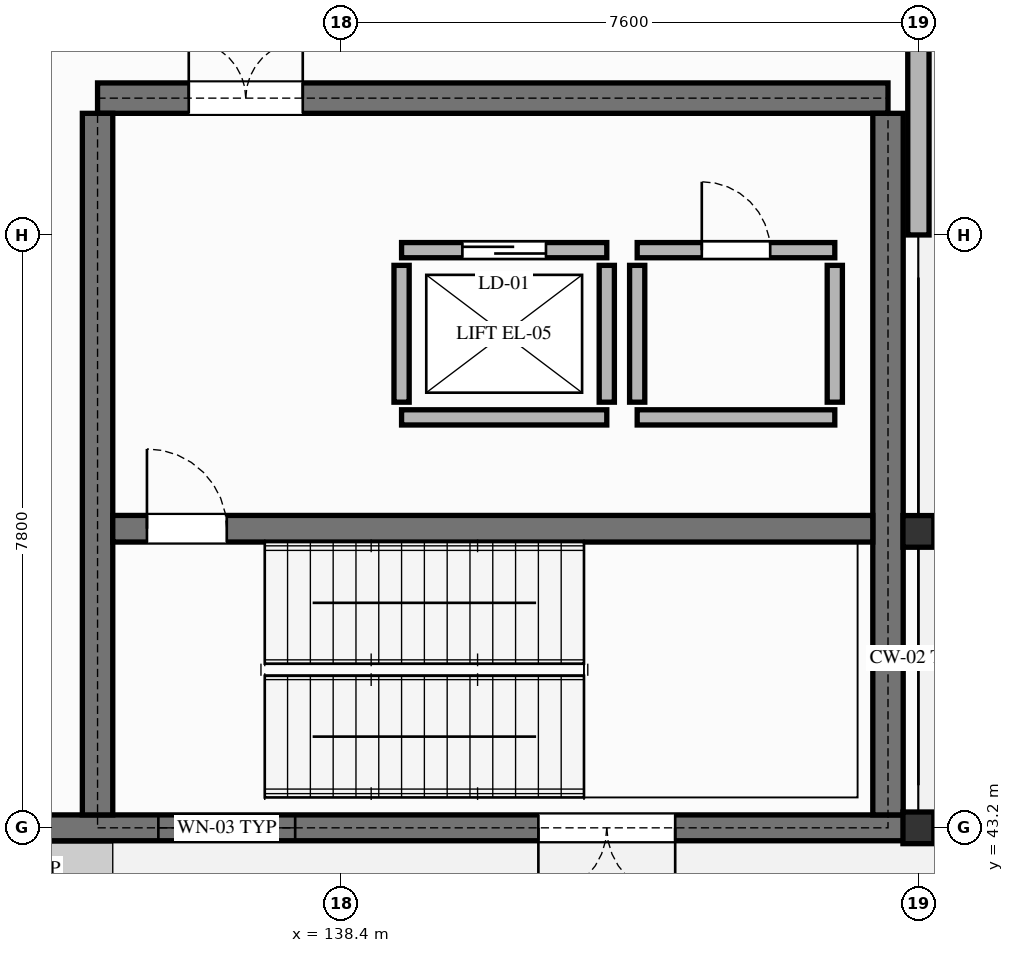
"""IFC4 building model, lengths in metres.
Left out: names, types, materials, properties, quantities, classifications, styles, units other than length and angle.
Written with IfcOpenShell. Run it as: python <this file> out.ifc"""

import sys

from ifc_helpers import new_model, si_unit, direction, frame, frame_2d, origin, origin_2d, place, context, subcontext, project, spatial, rectangle, i_section, extrude, element, fill, save


model = new_model("IFC4")
c1 = context("Model", 3, precision=1e-05, world=origin(), true_north=direction((0.0, 1.0)))
c2 = subcontext(c1, "Body", "Model", "MODEL_VIEW")
j1 = project(units=[si_unit("LENGTHUNIT", "METRE"), si_unit("PLANEANGLEUNIT", "RADIAN")], contexts=[c1])
p1 = place(None, origin())
s1 = spatial("IfcSite", under=j1, at=p1, CompositionType="ELEMENT")
p2 = place(p1, origin())
s2 = spatial("IfcBuilding", under=s1, at=p2, CompositionType="ELEMENT")
p3 = place(p2, origin())
s3 = spatial("IfcBuildingStorey", under=s2, at=p3, CompositionType="ELEMENT", Elevation=0.0)
for number, where, z_axis, x_axis in (
    (1, (146.0, 47.1, 0.0), (0.0, 0.0, 1.0), (1.0, 0.0, 0.0)),
    (2, (146.0, 43.2, 0.0), (0.0, 0.0, 1.0), (1.0, 0.0, 0.0)),
):
    element("IfcColumn", number, at=place(p3, frame(where, z_axis=z_axis, x_axis=x_axis)), inside=s3, PredefinedType="COLUMN", context=c2, shape_type="SweptSolid", body=[
        extrude(i_section(OverallWidth=0.406, OverallDepth=0.417, WebThickness=0.03, FlangeThickness=0.048, at=origin_2d()), origin(), (0.0, 0.0, 1.0), 5.1),
    ])
p4 = place(p3, frame((130.8, 43.2, 0.0), z_axis=(0.0, 0.0, 1.0), x_axis=(1.0, 0.0, 0.0)))
e3 = element("IfcWall", 3, at=p4, inside=s3, PredefinedType="SOLIDWALL", context=c2, shape_type="SweptSolid", body=[
    extrude(rectangle(XDim=15.2, YDim=0.34, at=frame_2d((7.6, 0.0))), origin(), (0.0, 0.0, 1.0), 4.8),
])
p5 = place(p4, frame((10.2, 0.0, 0.0)))
e4 = element("IfcOpeningElement", 4, at=p5, cuts=e3, PredefinedType="OPENING", context=c2, shape_type="SweptSolid", body=[
    extrude(rectangle(XDim=1.8, YDim=2.4, at=frame_2d((0.9, 1.2))), frame((0.0, 0.18, 0.0), z_axis=(0.0, -1.0, 0.0), x_axis=(1.0, 0.0, 0.0)), (0.0, 0.0, 1.0), 0.36),
])
p6 = place(p4, frame((5.2, 0.0, 0.9)))
e5 = element("IfcOpeningElement", 5, at=p6, cuts=e3, PredefinedType="OPENING", context=c2, shape_type="SweptSolid", body=[
    extrude(rectangle(XDim=1.8, YDim=2.1, at=frame_2d((0.9, 1.05))), frame((0.0, 0.18, 0.0), z_axis=(0.0, -1.0, 0.0), x_axis=(1.0, 0.0, 0.0)), (0.0, 0.0, 1.0), 0.36),
])
p7 = place(p3, frame((146.0, 51.0, 0.0), z_axis=(0.0, 0.0, 1.0), x_axis=(0.0, 1.0, 0.0)))
e6 = element("IfcWall", 6, at=p7, inside=s3, PredefinedType="SOLIDWALL", context=c2, shape_type="SweptSolid", body=[
    extrude(rectangle(XDim=7.8, YDim=0.28, at=frame_2d((3.9, 0.0))), origin(), (0.0, 0.0, 1.0), 4.8),
])
p8 = place(p7, frame((2.6, 0.0, 0.0)))
e7 = element("IfcOpeningElement", 7, at=p8, cuts=e6, PredefinedType="OPENING", context=c2, shape_type="SweptSolid", body=[
    extrude(rectangle(XDim=1.8, YDim=2.6, at=frame_2d((0.9, 1.3))), frame((0.0, 0.15, 0.0), z_axis=(0.0, -1.0, 0.0), x_axis=(1.0, 0.0, 0.0)), (0.0, 0.0, 1.0), 0.3),
])
p9 = place(p3, frame((135.2, 52.8, 0.0), z_axis=(0.0, 0.0, 1.0), x_axis=(1.0, 0.0, 0.0)))
e8 = element("IfcWall", 8, at=p9, inside=s3, PredefinedType="SHEAR", context=c2, shape_type="SweptSolid", body=[
    extrude(rectangle(XDim=10.4, YDim=0.4, at=frame_2d((5.2, 0.0))), origin(), (0.0, 0.0, 1.0), 4.8),
])
p10 = place(p9, frame((1.2, 0.0, 0.0)))
e9 = element("IfcOpeningElement", 9, at=p10, cuts=e8, PredefinedType="OPENING", context=c2, shape_type="SweptSolid", body=[
    extrude(rectangle(XDim=1.5, YDim=2.2, at=frame_2d((0.75, 1.1))), frame((0.0, 0.21, 0.0), z_axis=(0.0, -1.0, 0.0), x_axis=(1.0, 0.0, 0.0)), (0.0, 0.0, 1.0), 0.42),
])
for number, where, z_axis, x_axis in (
    (10, (135.2, 43.37, 0.0), (0.0, 0.0, 1.0), (0.0, 1.0, 0.0)),
    (11, (145.6, 43.37, 0.0), (0.0, 0.0, 1.0), (0.0, 1.0, 0.0)),
):
    element("IfcWall", number, at=place(p3, frame(where, z_axis=z_axis, x_axis=x_axis)), inside=s3, PredefinedType="SHEAR", context=c2, shape_type="SweptSolid", body=[
        extrude(rectangle(XDim=9.23, YDim=0.4, at=frame_2d((4.615, 0.0))), origin(), (0.0, 0.0, 1.0), 4.8),
    ])
p11 = place(p3, frame((135.4, 47.135, 0.0), z_axis=(0.0, 0.0, 1.0), x_axis=(1.0, 0.0, 0.0)))
e12 = element("IfcWall", 12, at=p11, inside=s3, PredefinedType="SHEAR", context=c2, shape_type="SweptSolid", body=[
    extrude(rectangle(XDim=10.0, YDim=0.35, at=frame_2d((5.0, 0.0))), origin(), (0.0, 0.0, 1.0), 4.8),
])
p12 = place(p11, frame((0.45, 0.0, 0.0)))
e13 = element("IfcOpeningElement", 13, at=p12, cuts=e12, PredefinedType="OPENING", context=c2, shape_type="SweptSolid", body=[
    extrude(rectangle(XDim=1.05, YDim=2.2, at=frame_2d((0.525, 1.1))), frame((0.0, 0.185, 0.0), z_axis=(0.0, -1.0, 0.0), x_axis=(1.0, 0.0, 0.0)), (0.0, 0.0, 1.0), 0.37),
])
p13 = place(p3, frame((139.2, 48.6, 0.0), z_axis=(0.0, 0.0, 1.0), x_axis=(1.0, 0.0, 0.0)))
e14 = element("IfcWall", 14, at=p13, inside=s3, PredefinedType="PARTITIONING", context=c2, shape_type="SweptSolid", body=[
    extrude(rectangle(XDim=2.7, YDim=0.2, at=frame_2d((1.35, 0.0))), origin(), (0.0, 0.0, 1.0), 4.8),
])
p14 = place(p3, frame((139.2, 50.8, 0.0), z_axis=(0.0, 0.0, 1.0), x_axis=(1.0, 0.0, 0.0)))
e15 = element("IfcWall", 15, at=p14, inside=s3, PredefinedType="PARTITIONING", context=c2, shape_type="SweptSolid", body=[
    extrude(rectangle(XDim=2.7, YDim=0.2, at=frame_2d((1.35, 0.0))), origin(), (0.0, 0.0, 1.0), 4.8),
])
p15 = place(p14, frame((0.8, 0.0, 0.0)))
e16 = element("IfcOpeningElement", 16, at=p15, cuts=e15, PredefinedType="OPENING", context=c2, shape_type="SweptSolid", body=[
    extrude(rectangle(XDim=1.1, YDim=2.15, at=frame_2d((0.55, 1.075))), frame((0.0, 0.11, 0.0), z_axis=(0.0, -1.0, 0.0), x_axis=(1.0, 0.0, 0.0)), (0.0, 0.0, 1.0), 0.22),
])
for number, where, z_axis, x_axis in (
    (17, (139.2, 48.8, 0.0), (0.0, 0.0, 1.0), (0.0, 1.0, 0.0)),
    (18, (141.9, 48.8, 0.0), (0.0, 0.0, 1.0), (0.0, 1.0, 0.0)),
):
    element("IfcWall", number, at=place(p3, frame(where, z_axis=z_axis, x_axis=x_axis)), inside=s3, PredefinedType="PARTITIONING", context=c2, shape_type="SweptSolid", body=[
        extrude(rectangle(XDim=1.8, YDim=0.2, at=frame_2d((0.9, 0.0))), origin(), (0.0, 0.0, 1.0), 4.8),
    ])
p16 = place(p3, frame((142.3, 48.6, 0.0), z_axis=(0.0, 0.0, 1.0), x_axis=(1.0, 0.0, 0.0)))
e19 = element("IfcWall", 19, at=p16, inside=s3, PredefinedType="PARTITIONING", context=c2, shape_type="SweptSolid", body=[
    extrude(rectangle(XDim=2.6, YDim=0.2, at=frame_2d((1.3, 0.0))), origin(), (0.0, 0.0, 1.0), 4.8),
])
p17 = place(p3, frame((142.3, 50.8, 0.0), z_axis=(0.0, 0.0, 1.0), x_axis=(1.0, 0.0, 0.0)))
e20 = element("IfcWall", 20, at=p17, inside=s3, PredefinedType="PARTITIONING", context=c2, shape_type="SweptSolid", body=[
    extrude(rectangle(XDim=2.6, YDim=0.2, at=frame_2d((1.3, 0.0))), origin(), (0.0, 0.0, 1.0), 4.8),
])
p18 = place(p17, frame((0.85, 0.0, 0.0)))
e21 = element("IfcOpeningElement", 21, at=p18, cuts=e20, PredefinedType="OPENING", context=c2, shape_type="SweptSolid", body=[
    extrude(rectangle(XDim=0.9, YDim=2.1, at=frame_2d((0.45, 1.05))), frame((0.0, 0.11, 0.0), z_axis=(0.0, -1.0, 0.0), x_axis=(1.0, 0.0, 0.0)), (0.0, 0.0, 1.0), 0.22),
])
for number, where, z_axis, x_axis in (
    (22, (142.3, 48.8, 0.0), (0.0, 0.0, 1.0), (0.0, 1.0, 0.0)),
    (23, (144.9, 48.8, 0.0), (0.0, 0.0, 1.0), (0.0, 1.0, 0.0)),
):
    element("IfcWall", number, at=place(p3, frame(where, z_axis=z_axis, x_axis=x_axis)), inside=s3, PredefinedType="PARTITIONING", context=c2, shape_type="SweptSolid", body=[
        extrude(rectangle(XDim=1.8, YDim=0.2, at=frame_2d((0.9, 0.0))), origin(), (0.0, 0.0, 1.0), 4.8),
    ])
p19 = place(p5, frame((1.8, 0.0, 0.0), z_axis=(0.0, 0.0, 1.0), x_axis=(-1.0, 0.0, 0.0)))
e24 = element("IfcDoor", 24, at=p19, inside=s3, OperationType="DOUBLE_DOOR_SINGLE_SWING", PredefinedType="DOOR", context=c2, shape_type="SweptSolid", body=[
    extrude(rectangle(XDim=1.8, YDim=2.4, at=frame_2d((0.9, 1.2))), frame((0.0, 0.025, 0.0), z_axis=(0.0, -1.0, 0.0), x_axis=(1.0, 0.0, 0.0)), (0.0, 0.0, 1.0), 0.05),
])
fill(e4, e24)
p20 = place(p6, origin())
e25 = element("IfcWindow", 25, at=p20, inside=s3, PartitioningType="SINGLE_PANEL", PredefinedType="WINDOW", context=c2, shape_type="SweptSolid", body=[
    extrude(rectangle(XDim=1.8, YDim=2.1, at=frame_2d((0.9, 1.05))), frame((0.0, 0.03, 0.0), z_axis=(0.0, -1.0, 0.0), x_axis=(1.0, 0.0, 0.0)), (0.0, 0.0, 1.0), 0.06),
])
fill(e5, e25)
p21 = place(p10, origin())
e26 = element("IfcDoor", 26, at=p21, inside=s3, OperationType="DOUBLE_DOOR_SINGLE_SWING", PredefinedType="DOOR", context=c2, shape_type="SweptSolid", body=[
    extrude(rectangle(XDim=1.5, YDim=2.2, at=frame_2d((0.75, 1.1))), frame((0.0, 0.025, 0.0), z_axis=(0.0, -1.0, 0.0), x_axis=(1.0, 0.0, 0.0)), (0.0, 0.0, 1.0), 0.05),
])
fill(e9, e26)
p22 = place(p12, origin())
e27 = element("IfcDoor", 27, at=p22, inside=s3, OperationType="SINGLE_SWING_LEFT", PredefinedType="DOOR", context=c2, shape_type="SweptSolid", body=[
    extrude(rectangle(XDim=1.05, YDim=2.2, at=frame_2d((0.525, 1.1))), frame((0.0, 0.025, 0.0), z_axis=(0.0, -1.0, 0.0), x_axis=(1.0, 0.0, 0.0)), (0.0, 0.0, 1.0), 0.05),
])
fill(e13, e27)
p23 = place(p15, origin())
e28 = element("IfcDoor", 28, at=p23, inside=s3, OperationType="SLIDING_TO_LEFT", PredefinedType="DOOR", context=c2, shape_type="SweptSolid", body=[
    extrude(rectangle(XDim=1.1, YDim=2.15, at=frame_2d((0.55, 1.075))), frame((0.0, 0.025, 0.0), z_axis=(0.0, -1.0, 0.0), x_axis=(1.0, 0.0, 0.0)), (0.0, 0.0, 1.0), 0.05),
])
fill(e16, e28)
p24 = place(p18, origin())
e29 = element("IfcDoor", 29, at=p24, inside=s3, OperationType="SINGLE_SWING_LEFT", PredefinedType="DOOR", context=c2, shape_type="SweptSolid", body=[
    extrude(rectangle(XDim=0.9, YDim=2.1, at=frame_2d((0.45, 1.05))), frame((0.0, 0.025, 0.0), z_axis=(0.0, -1.0, 0.0), x_axis=(1.0, 0.0, 0.0)), (0.0, 0.0, 1.0), 0.05),
])
fill(e21, e29)
save(model, sys.argv[1])
